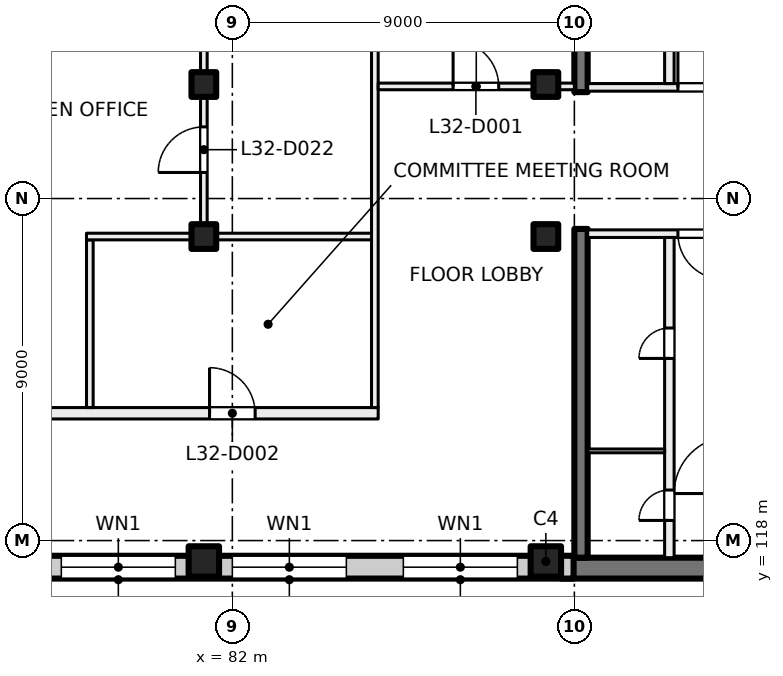
"""IFC4 building model, lengths in metres.
Left out: names, types, materials, properties, quantities, classifications, styles, units other than length and angle.
Written with IfcOpenShell. Run it as: python <this file> out.ifc"""

import sys

from ifc_helpers import new_model, si_unit, direction, frame, frame_2d, origin, origin_2d, place, context, subcontext, project, spatial, rectangle, extrude, element, fill, save


model = new_model("IFC4")
c1 = context("Model", 3, precision=1e-05, world=origin(), true_north=direction((0.0, 1.0)))
c2 = subcontext(c1, "Body", "Model", "MODEL_VIEW")
j1 = project(units=[si_unit("LENGTHUNIT", "METRE"), si_unit("PLANEANGLEUNIT", "RADIAN")], contexts=[c1])
p1 = place(None, origin())
s1 = spatial("IfcSite", under=j1, at=p1, CompositionType="ELEMENT")
p2 = place(p1, origin())
s2 = spatial("IfcBuilding", under=s1, at=p2, CompositionType="ELEMENT")
p3 = place(p2, frame((0.0, 0.0, 138.5)))
s3 = spatial("IfcBuildingStorey", under=s2, at=p3, CompositionType="ELEMENT", Elevation=138.5)
for number, where, z_axis, x_axis in (
    (1, (81.25, 130.0, 0.0), (0.0, 0.0, 1.0), (1.0, 0.0, 0.0)),
    (2, (90.25, 130.0, 0.0), (0.0, 0.0, 1.0), (1.0, 0.0, 0.0)),
    (3, (81.25, 126.0, 0.0), (0.0, 0.0, 1.0), (1.0, 0.0, 0.0)),
    (4, (90.25, 126.0, 0.0), (0.0, 0.0, 1.0), (1.0, 0.0, 0.0)),
):
    element("IfcColumn", number, at=place(p3, frame(where, z_axis=z_axis, x_axis=x_axis)), inside=s3, PredefinedType="COLUMN", context=c2, shape_type="SweptSolid", body=[
        extrude(rectangle(XDim=0.65, YDim=0.65, at=origin_2d()), origin(), (0.0, 0.0, 1.0), 4.0),
    ])
for number, where, z_axis, x_axis in (
    (5, (81.25, 117.45, 0.0), (0.0, 0.0, 1.0), (1.0, 0.0, 0.0)),
    (6, (90.25, 117.45, 0.0), (0.0, 0.0, 1.0), (1.0, 0.0, 0.0)),
):
    element("IfcColumn", number, at=place(p3, frame(where, z_axis=z_axis, x_axis=x_axis)), inside=s3, PredefinedType="COLUMN", context=c2, shape_type="SweptSolid", body=[
        extrude(rectangle(XDim=0.8, YDim=0.8, at=origin_2d()), origin(), (0.0, 0.0, 1.0), 4.0),
    ])
p4 = place(p3, frame((99.6, 117.275, 0.0), z_axis=(0.0, 0.0, 1.0), x_axis=(-1.0, 0.0, 0.0)))
e7 = element("IfcWall", 7, at=p4, inside=s3, PredefinedType="SHEAR", context=c2, shape_type="SweptSolid", body=[
    extrude(rectangle(XDim=8.95, YDim=0.55, at=frame_2d((4.475, 0.0))), origin(), (0.0, 0.0, 1.0), 4.0),
])
for number, where, z_axis, x_axis in (
    (8, (91.175, 138.45, 0.0), (0.0, 0.0, 1.0), (0.0, -1.0, 0.0)),
    (9, (91.175, 126.2, 0.0), (0.0, 0.0, 1.0), (0.0, -1.0, 0.0)),
):
    element("IfcWall", number, at=place(p3, frame(where, z_axis=z_axis, x_axis=x_axis)), inside=s3, PredefinedType="SHEAR", context=c2, shape_type="SweptSolid", body=[
        extrude(rectangle(XDim=8.65, YDim=0.35, at=frame_2d((4.325, 0.0))), origin(), (0.0, 0.0, 1.0), 4.0),
    ])
p5 = place(p3, frame((90.98, 117.3, 0.0), z_axis=(0.0, 0.0, 1.0), x_axis=(-1.0, 0.0, 0.0)))
e10 = element("IfcWall", 10, at=p5, inside=s3, PredefinedType="SOLIDWALL", context=c2, shape_type="SweptSolid", body=[
    extrude(rectangle(XDim=33.745, YDim=0.6, at=frame_2d((16.873, 0.0))), origin(), (0.0, 0.0, 1.0), 3.625),
])
p6 = place(p5, frame((1.48, 0.0, 0.9)))
e11 = element("IfcOpeningElement", 11, at=p6, cuts=e10, PredefinedType="OPENING", context=c2, shape_type="SweptSolid", body=[
    extrude(rectangle(XDim=3.0, YDim=2.4, at=frame_2d((1.5, 1.2))), frame((0.0, 0.31, 0.0), z_axis=(0.0, -1.0, 0.0), x_axis=(1.0, 0.0, 0.0)), (0.0, 0.0, 1.0), 0.62),
])
p7 = place(p5, frame((5.98, 0.0, 0.9)))
e12 = element("IfcOpeningElement", 12, at=p7, cuts=e10, PredefinedType="OPENING", context=c2, shape_type="SweptSolid", body=[
    extrude(rectangle(XDim=3.0, YDim=2.4, at=frame_2d((1.5, 1.2))), frame((0.0, 0.31, 0.0), z_axis=(0.0, -1.0, 0.0), x_axis=(1.0, 0.0, 0.0)), (0.0, 0.0, 1.0), 0.62),
])
p8 = place(p5, frame((10.48, 0.0, 0.9)))
e13 = element("IfcOpeningElement", 13, at=p8, cuts=e10, PredefinedType="OPENING", context=c2, shape_type="SweptSolid", body=[
    extrude(rectangle(XDim=3.0, YDim=2.4, at=frame_2d((1.5, 1.2))), frame((0.0, 0.31, 0.0), z_axis=(0.0, -1.0, 0.0), x_axis=(1.0, 0.0, 0.0)), (0.0, 0.0, 1.0), 0.62),
])
p9 = place(p5, frame((14.98, 0.0, 0.9)))
e14 = element("IfcOpeningElement", 14, at=p9, cuts=e10, PredefinedType="OPENING", context=c2, shape_type="SweptSolid", body=[
    extrude(rectangle(XDim=3.0, YDim=2.4, at=frame_2d((1.5, 1.2))), frame((0.0, 0.31, 0.0), z_axis=(0.0, -1.0, 0.0), x_axis=(1.0, 0.0, 0.0)), (0.0, 0.0, 1.0), 0.62),
])
p10 = place(p5, frame((19.48, 0.0, 0.9)))
e15 = element("IfcOpeningElement", 15, at=p10, cuts=e10, PredefinedType="OPENING", context=c2, shape_type="SweptSolid", body=[
    extrude(rectangle(XDim=3.0, YDim=2.4, at=frame_2d((1.5, 1.2))), frame((0.0, 0.31, 0.0), z_axis=(0.0, -1.0, 0.0), x_axis=(1.0, 0.0, 0.0)), (0.0, 0.0, 1.0), 0.62),
])
p11 = place(p5, frame((23.98, 0.0, 0.9)))
e16 = element("IfcOpeningElement", 16, at=p11, cuts=e10, PredefinedType="OPENING", context=c2, shape_type="SweptSolid", body=[
    extrude(rectangle(XDim=3.0, YDim=2.4, at=frame_2d((1.5, 1.2))), frame((0.0, 0.31, 0.0), z_axis=(0.0, -1.0, 0.0), x_axis=(1.0, 0.0, 0.0)), (0.0, 0.0, 1.0), 0.62),
])
p12 = place(p5, frame((28.48, 0.0, 0.9)))
e17 = element("IfcOpeningElement", 17, at=p12, cuts=e10, PredefinedType="OPENING", context=c2, shape_type="SweptSolid", body=[
    extrude(rectangle(XDim=3.0, YDim=2.4, at=frame_2d((1.5, 1.2))), frame((0.0, 0.31, 0.0), z_axis=(0.0, -1.0, 0.0), x_axis=(1.0, 0.0, 0.0)), (0.0, 0.0, 1.0), 0.62),
])
p13 = place(p3, frame((95.225, 126.075, 0.0), z_axis=(0.0, 0.0, 1.0), x_axis=(-1.0, 0.0, 0.0)))
e18 = element("IfcWall", 18, at=p13, inside=s3, PredefinedType="PARTITIONING", context=c2, shape_type="SweptSolid", body=[
    extrude(rectangle(XDim=3.875, YDim=0.2, at=frame_2d((1.938, 0.0))), origin(), (0.0, 0.0, 1.0), 3.625),
])
p14 = place(p13, frame((0.3, 0.0, 0.0)))
e19 = element("IfcOpeningElement", 19, at=p14, cuts=e18, PredefinedType="OPENING", context=c2, shape_type="SweptSolid", body=[
    extrude(rectangle(XDim=1.2, YDim=2.1, at=frame_2d((0.6, 1.05))), frame((0.0, 0.11, 0.0), z_axis=(0.0, -1.0, 0.0), x_axis=(1.0, 0.0, 0.0)), (0.0, 0.0, 1.0), 0.22),
])
p15 = place(p3, frame((93.5, 117.55, 0.0), z_axis=(0.0, 0.0, 1.0), x_axis=(0.0, 1.0, 0.0)))
e20 = element("IfcWall", 20, at=p15, inside=s3, PredefinedType="PARTITIONING", context=c2, shape_type="SweptSolid", body=[
    extrude(rectangle(XDim=8.425, YDim=0.25, at=frame_2d((4.212, 0.0))), origin(), (0.0, 0.0, 1.0), 3.625),
])
p16 = place(p15, frame((5.242, 0.0, 0.0)))
e21 = element("IfcOpeningElement", 21, at=p16, cuts=e20, PredefinedType="OPENING", context=c2, shape_type="SweptSolid", body=[
    extrude(rectangle(XDim=0.8, YDim=2.1, at=frame_2d((0.4, 1.05))), frame((0.0, 0.135, 0.0), z_axis=(0.0, -1.0, 0.0), x_axis=(1.0, 0.0, 0.0)), (0.0, 0.0, 1.0), 0.27),
])
p17 = place(p15, frame((0.98, 0.0, 0.0)))
e22 = element("IfcOpeningElement", 22, at=p17, cuts=e20, PredefinedType="OPENING", context=c2, shape_type="SweptSolid", body=[
    extrude(rectangle(XDim=0.8, YDim=2.1, at=frame_2d((0.4, 1.05))), frame((0.0, 0.135, 0.0), z_axis=(0.0, -1.0, 0.0), x_axis=(1.0, 0.0, 0.0)), (0.0, 0.0, 1.0), 0.27),
])
p18 = place(p3, frame((93.375, 120.36, 0.0), z_axis=(0.0, 0.0, 1.0), x_axis=(-1.0, 0.0, 0.0)))
e23 = element("IfcWall", 23, at=p18, inside=s3, PredefinedType="PARTITIONING", context=c2, shape_type="SweptSolid", body=[
    extrude(rectangle(XDim=2.025, YDim=0.1, at=frame_2d((1.012, 0.0))), origin(), (0.0, 0.0, 1.0), 3.625),
])
p19 = place(p3, frame((91.35, 129.925, 0.0), z_axis=(0.0, 0.0, 1.0), x_axis=(1.0, 0.0, 0.0)))
e24 = element("IfcWall", 24, at=p19, inside=s3, PredefinedType="PARTITIONING", context=c2, shape_type="SweptSolid", body=[
    extrude(rectangle(XDim=3.875, YDim=0.2, at=frame_2d((1.938, 0.0))), origin(), (0.0, 0.0, 1.0), 3.625),
])
p20 = place(p19, frame((2.375, 0.0, 0.0)))
e25 = element("IfcOpeningElement", 25, at=p20, cuts=e24, PredefinedType="OPENING", context=c2, shape_type="SweptSolid", body=[
    extrude(rectangle(XDim=1.2, YDim=2.1, at=frame_2d((0.6, 1.05))), frame((0.0, 0.11, 0.0), z_axis=(0.0, -1.0, 0.0), x_axis=(1.0, 0.0, 0.0)), (0.0, 0.0, 1.0), 0.22),
])
p21 = place(p3, frame((93.5, 130.025, 0.0), z_axis=(0.0, 0.0, 1.0), x_axis=(0.0, 1.0, 0.0)))
e26 = element("IfcWall", 26, at=p21, inside=s3, PredefinedType="PARTITIONING", context=c2, shape_type="SweptSolid", body=[
    extrude(rectangle(XDim=8.425, YDim=0.25, at=frame_2d((4.212, 0.0))), origin(), (0.0, 0.0, 1.0), 3.625),
])
p22 = place(p21, frame((2.383, 0.0, 0.0)))
e27 = element("IfcOpeningElement", 27, at=p22, cuts=e26, PredefinedType="OPENING", context=c2, shape_type="SweptSolid", body=[
    extrude(rectangle(XDim=0.8, YDim=2.1, at=frame_2d((0.4, 1.05))), frame((0.0, 0.135, 0.0), z_axis=(0.0, -1.0, 0.0), x_axis=(1.0, 0.0, 0.0)), (0.0, 0.0, 1.0), 0.27),
])
p23 = place(p21, frame((6.645, 0.0, 0.0)))
e28 = element("IfcOpeningElement", 28, at=p23, cuts=e26, PredefinedType="OPENING", context=c2, shape_type="SweptSolid", body=[
    extrude(rectangle(XDim=0.8, YDim=2.1, at=frame_2d((0.4, 1.05))), frame((0.0, 0.135, 0.0), z_axis=(0.0, -1.0, 0.0), x_axis=(1.0, 0.0, 0.0)), (0.0, 0.0, 1.0), 0.27),
])
p24 = place(p3, frame((50.506, 121.35, 0.0), z_axis=(0.0, 0.0, 1.0), x_axis=(1.0, 0.0, 0.0)))
e29 = element("IfcWall", 29, at=p24, inside=s3, PredefinedType="PARTITIONING", context=c2, shape_type="SweptSolid", body=[
    extrude(rectangle(XDim=35.332, YDim=0.3, at=frame_2d((17.666, 0.0))), origin(), (0.0, 0.0, 1.0), 3.625),
])
p25 = place(p24, frame((30.894, 0.0, 0.0)))
e30 = element("IfcOpeningElement", 30, at=p25, cuts=e29, PredefinedType="OPENING", context=c2, shape_type="SweptSolid", body=[
    extrude(rectangle(XDim=1.2, YDim=2.1, at=frame_2d((0.6, 1.05))), frame((0.0, 0.16, 0.0), z_axis=(0.0, -1.0, 0.0), x_axis=(1.0, 0.0, 0.0)), (0.0, 0.0, 1.0), 0.32),
])
p26 = place(p24, frame((23.844, 0.0, 0.0)))
e31 = element("IfcOpeningElement", 31, at=p26, cuts=e29, PredefinedType="OPENING", context=c2, shape_type="SweptSolid", body=[
    extrude(rectangle(XDim=1.8, YDim=2.1, at=frame_2d((0.9, 1.05))), frame((0.0, 0.16, 0.0), z_axis=(0.0, -1.0, 0.0), x_axis=(1.0, 0.0, 0.0)), (0.0, 0.0, 1.0), 0.32),
])
p27 = place(p24, frame((18.144, 0.0, 0.0)))
e32 = element("IfcOpeningElement", 32, at=p27, cuts=e29, PredefinedType="OPENING", context=c2, shape_type="SweptSolid", body=[
    extrude(rectangle(XDim=1.2, YDim=2.1, at=frame_2d((0.6, 1.05))), frame((0.0, 0.16, 0.0), z_axis=(0.0, -1.0, 0.0), x_axis=(1.0, 0.0, 0.0)), (0.0, 0.0, 1.0), 0.32),
])
p28 = place(p24, frame((13.844, 0.0, 0.0)))
e33 = element("IfcOpeningElement", 33, at=p28, cuts=e29, PredefinedType="OPENING", context=c2, shape_type="SweptSolid", body=[
    extrude(rectangle(XDim=0.8, YDim=2.1, at=frame_2d((0.4, 1.05))), frame((0.0, 0.16, 0.0), z_axis=(0.0, -1.0, 0.0), x_axis=(1.0, 0.0, 0.0)), (0.0, 0.0, 1.0), 0.32),
])
p29 = place(p24, frame((7.344, 0.0, 0.0)))
e34 = element("IfcOpeningElement", 34, at=p29, cuts=e29, PredefinedType="OPENING", context=c2, shape_type="SweptSolid", body=[
    extrude(rectangle(XDim=1.8, YDim=2.1, at=frame_2d((0.9, 1.05))), frame((0.0, 0.16, 0.0), z_axis=(0.0, -1.0, 0.0), x_axis=(1.0, 0.0, 0.0)), (0.0, 0.0, 1.0), 0.32),
])
p30 = place(p24, frame((1.047, 0.0, 0.0)))
e35 = element("IfcOpeningElement", 35, at=p30, cuts=e29, PredefinedType="OPENING", context=c2, shape_type="SweptSolid", body=[
    extrude(rectangle(XDim=1.8, YDim=2.1, at=frame_2d((0.9, 1.05))), frame((0.0, 0.16, 0.0), z_axis=(0.0, -1.0, 0.0), x_axis=(1.0, 0.0, 0.0)), (0.0, 0.0, 1.0), 0.32),
])
p31 = place(p3, frame((78.25, 125.912, 0.0), z_axis=(0.0, 0.0, 1.0), x_axis=(0.0, -1.0, 0.0)))
e36 = element("IfcWall", 36, at=p31, inside=s3, PredefinedType="PARTITIONING", context=c2, shape_type="SweptSolid", body=[
    extrude(rectangle(XDim=4.412, YDim=0.175, at=frame_2d((2.206, 0.0))), origin(), (0.0, 0.0, 1.0), 3.625),
])
p32 = place(p3, frame((78.162, 126.0, 0.0), z_axis=(0.0, 0.0, 1.0), x_axis=(1.0, 0.0, 0.0)))
e37 = element("IfcWall", 37, at=p32, inside=s3, PredefinedType="PARTITIONING", context=c2, shape_type="SweptSolid", body=[
    extrude(rectangle(XDim=7.5, YDim=0.175, at=frame_2d((3.75, 0.0))), origin(), (0.0, 0.0, 1.0), 3.625),
])
p33 = place(p3, frame((81.25, 126.088, 0.0), z_axis=(0.0, 0.0, 1.0), x_axis=(0.0, 1.0, 0.0)))
e38 = element("IfcWall", 38, at=p33, inside=s3, PredefinedType="PARTITIONING", context=c2, shape_type="SweptSolid", body=[
    extrude(rectangle(XDim=12.312, YDim=0.175, at=frame_2d((6.156, 0.0))), origin(), (0.0, 0.0, 1.0), 3.625),
])
p34 = place(p33, frame((1.597, 0.0, 0.0)))
e39 = element("IfcOpeningElement", 39, at=p34, cuts=e38, PredefinedType="OPENING", context=c2, shape_type="SweptSolid", body=[
    extrude(rectangle(XDim=1.2, YDim=2.1, at=frame_2d((0.6, 1.05))), frame((0.0, 0.097, 0.0), z_axis=(0.0, -1.0, 0.0), x_axis=(1.0, 0.0, 0.0)), (0.0, 0.0, 1.0), 0.195),
])
p35 = place(p3, frame((85.75, 121.5, 0.0), z_axis=(0.0, 0.0, 1.0), x_axis=(0.0, 1.0, 0.0)))
e40 = element("IfcWall", 40, at=p35, inside=s3, PredefinedType="PARTITIONING", context=c2, shape_type="SweptSolid", body=[
    extrude(rectangle(XDim=16.9, YDim=0.175, at=frame_2d((8.45, 0.0))), origin(), (0.0, 0.0, 1.0), 3.625),
])
p36 = place(p3, frame((85.838, 129.95, 0.0), z_axis=(0.0, 0.0, 1.0), x_axis=(1.0, 0.0, 0.0)))
e41 = element("IfcWall", 41, at=p36, inside=s3, PredefinedType="PARTITIONING", context=c2, shape_type="SweptSolid", body=[
    extrude(rectangle(XDim=5.162, YDim=0.175, at=frame_2d((2.581, 0.0))), origin(), (0.0, 0.0, 1.0), 3.625),
])
p37 = place(p36, frame((1.971, 0.0, 0.0)))
e42 = element("IfcOpeningElement", 42, at=p37, cuts=e41, PredefinedType="OPENING", context=c2, shape_type="SweptSolid", body=[
    extrude(rectangle(XDim=1.2, YDim=2.1, at=frame_2d((0.6, 1.05))), frame((0.0, 0.097, 0.0), z_axis=(0.0, -1.0, 0.0), x_axis=(1.0, 0.0, 0.0)), (0.0, 0.0, 1.0), 0.195),
])
p38 = place(p6, origin())
e43 = element("IfcWindow", 43, at=p38, inside=s3, PartitioningType="SINGLE_PANEL", PredefinedType="WINDOW", context=c2, shape_type="SweptSolid", body=[
    extrude(rectangle(XDim=3.0, YDim=2.4, at=frame_2d((1.5, 1.2))), frame((0.0, 0.03, 0.0), z_axis=(0.0, -1.0, 0.0), x_axis=(1.0, 0.0, 0.0)), (0.0, 0.0, 1.0), 0.06),
])
fill(e11, e43)
p39 = place(p7, origin())
e44 = element("IfcWindow", 44, at=p39, inside=s3, PartitioningType="SINGLE_PANEL", PredefinedType="WINDOW", context=c2, shape_type="SweptSolid", body=[
    extrude(rectangle(XDim=3.0, YDim=2.4, at=frame_2d((1.5, 1.2))), frame((0.0, 0.03, 0.0), z_axis=(0.0, -1.0, 0.0), x_axis=(1.0, 0.0, 0.0)), (0.0, 0.0, 1.0), 0.06),
])
fill(e12, e44)
p40 = place(p8, origin())
e45 = element("IfcWindow", 45, at=p40, inside=s3, PartitioningType="SINGLE_PANEL", PredefinedType="WINDOW", context=c2, shape_type="SweptSolid", body=[
    extrude(rectangle(XDim=3.0, YDim=2.4, at=frame_2d((1.5, 1.2))), frame((0.0, 0.03, 0.0), z_axis=(0.0, -1.0, 0.0), x_axis=(1.0, 0.0, 0.0)), (0.0, 0.0, 1.0), 0.06),
])
fill(e13, e45)
p41 = place(p14, origin())
e46 = element("IfcDoor", 46, at=p41, inside=s3, OperationType="DOUBLE_DOOR_SINGLE_SWING", PredefinedType="DOOR", context=c2, shape_type="SweptSolid", body=[
    extrude(rectangle(XDim=1.2, YDim=2.1, at=frame_2d((0.6, 1.05))), frame((0.0, 0.025, 0.0), z_axis=(0.0, -1.0, 0.0), x_axis=(1.0, 0.0, 0.0)), (0.0, 0.0, 1.0), 0.05),
])
fill(e19, e46)
p42 = place(p16, origin())
e47 = element("IfcDoor", 47, at=p42, inside=s3, OperationType="SINGLE_SWING_LEFT", PredefinedType="DOOR", context=c2, shape_type="SweptSolid", body=[
    extrude(rectangle(XDim=0.8, YDim=2.1, at=frame_2d((0.4, 1.05))), frame((0.0, 0.025, 0.0), z_axis=(0.0, -1.0, 0.0), x_axis=(1.0, 0.0, 0.0)), (0.0, 0.0, 1.0), 0.05),
])
fill(e21, e47)
p43 = place(p17, origin())
e48 = element("IfcDoor", 48, at=p43, inside=s3, OperationType="SINGLE_SWING_RIGHT", PredefinedType="DOOR", context=c2, shape_type="SweptSolid", body=[
    extrude(rectangle(XDim=0.8, YDim=2.1, at=frame_2d((0.4, 1.05))), frame((0.0, 0.025, 0.0), z_axis=(0.0, -1.0, 0.0), x_axis=(1.0, 0.0, 0.0)), (0.0, 0.0, 1.0), 0.05),
])
fill(e22, e48)
p44 = place(p20, origin())
e49 = element("IfcDoor", 49, at=p44, inside=s3, OperationType="DOUBLE_DOOR_SINGLE_SWING", PredefinedType="DOOR", context=c2, shape_type="SweptSolid", body=[
    extrude(rectangle(XDim=1.2, YDim=2.1, at=frame_2d((0.6, 1.05))), frame((0.0, 0.025, 0.0), z_axis=(0.0, -1.0, 0.0), x_axis=(1.0, 0.0, 0.0)), (0.0, 0.0, 1.0), 0.05),
])
fill(e25, e49)
p45 = place(p37, origin())
e50 = element("IfcDoor", 50, at=p45, inside=s3, OperationType="DOUBLE_DOOR_SINGLE_SWING", PredefinedType="DOOR", context=c2, shape_type="SweptSolid", body=[
    extrude(rectangle(XDim=1.2, YDim=2.1, at=frame_2d((0.6, 1.05))), frame((0.0, 0.025, 0.0), z_axis=(0.0, -1.0, 0.0), x_axis=(1.0, 0.0, 0.0)), (0.0, 0.0, 1.0), 0.05),
])
fill(e42, e50)
p46 = place(p25, origin())
e51 = element("IfcDoor", 51, at=p46, inside=s3, OperationType="DOUBLE_DOOR_SINGLE_SWING", PredefinedType="DOOR", context=c2, shape_type="SweptSolid", body=[
    extrude(rectangle(XDim=1.2, YDim=2.1, at=frame_2d((0.6, 1.05))), frame((0.0, 0.025, 0.0), z_axis=(0.0, -1.0, 0.0), x_axis=(1.0, 0.0, 0.0)), (0.0, 0.0, 1.0), 0.05),
])
fill(e30, e51)
p47 = place(p34, origin())
e52 = element("IfcDoor", 52, at=p47, inside=s3, OperationType="DOUBLE_DOOR_SINGLE_SWING", PredefinedType="DOOR", context=c2, shape_type="SweptSolid", body=[
    extrude(rectangle(XDim=1.2, YDim=2.1, at=frame_2d((0.6, 1.05))), frame((0.0, 0.025, 0.0), z_axis=(0.0, -1.0, 0.0), x_axis=(1.0, 0.0, 0.0)), (0.0, 0.0, 1.0), 0.05),
])
fill(e39, e52)
save(model, sys.argv[1])
